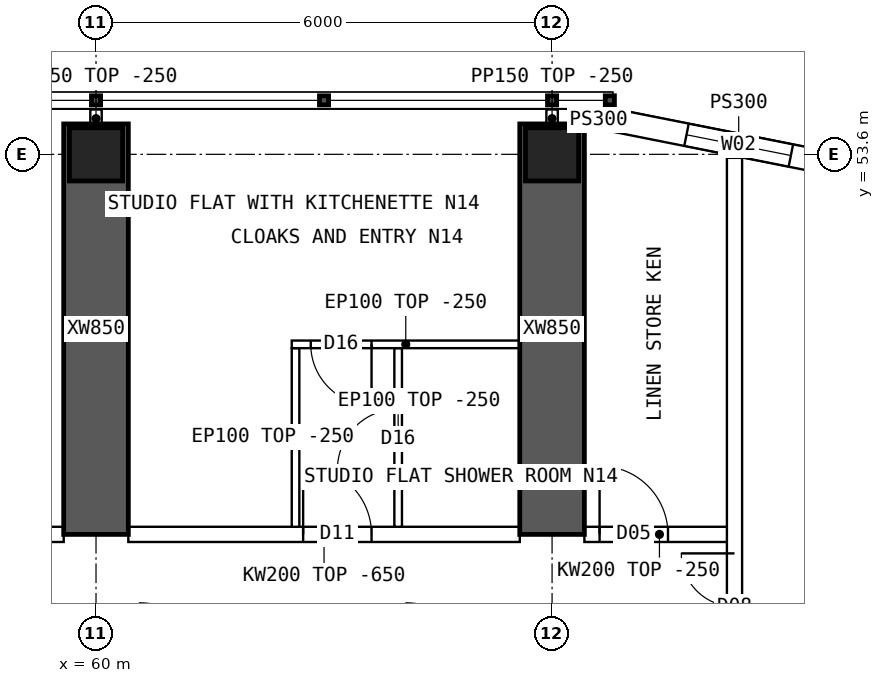
"""IFC4 building model, lengths in metres.
Left out: names, types, materials, properties, quantities, classifications, styles, units other than length and angle.
Written with IfcOpenShell. Run it as: python <this file> out.ifc"""

import sys

from ifc_helpers import new_model, si_unit, direction, frame, frame_2d, origin, origin_2d, place, context, subcontext, project, spatial, polyline, rectangle, hollow_rectangle, outline, extrude, element, fill, save


model = new_model("IFC4")
c1 = context("Model", 3, precision=1e-05, world=origin(), true_north=direction((0.0, 1.0)))
c2 = subcontext(c1, "Body", "Model", "MODEL_VIEW")
j1 = project(units=[si_unit("LENGTHUNIT", "METRE"), si_unit("PLANEANGLEUNIT", "RADIAN")], contexts=[c1])
p1 = place(None, origin())
s1 = spatial("IfcSite", under=j1, at=p1, CompositionType="ELEMENT")
p2 = place(p1, origin())
s2 = spatial("IfcBuilding", under=s1, at=p2, CompositionType="ELEMENT")
p3 = place(p2, frame((0.0, 0.0, 178.6)))
s3 = spatial("IfcBuildingStorey", under=s2, at=p3, CompositionType="ELEMENT", Elevation=178.6)
for number, where, z_axis, x_axis in (
    (1, (60.0, 53.6, 0.0), (0.0, 0.0, 1.0), (1.0, 0.0, 0.0)),
    (2, (66.0, 53.6, 0.0), (0.0, 0.0, 1.0), (1.0, 0.0, 0.0)),
):
    element("IfcColumn", number, at=place(p3, frame(where, z_axis=z_axis, x_axis=x_axis)), inside=s3, PredefinedType="COLUMN", context=c2, shape_type="SweptSolid", body=[
        extrude(hollow_rectangle(XDim=0.7, YDim=0.7, WallThickness=0.07, at=origin_2d()), origin(), (0.0, 0.0, 1.0), 3.75),
    ])
for number, where, z_axis, x_axis in (
    (3, (60.0, 48.6, 0.0), (0.0, 0.0, 1.0), (0.0, 1.0, 0.0)),
    (4, (66.0, 48.6, 0.0), (0.0, 0.0, 1.0), (0.0, 1.0, 0.0)),
):
    element("IfcWall", number, at=place(p3, frame(where, z_axis=z_axis, x_axis=x_axis)), inside=s3, PredefinedType="SHEAR", context=c2, shape_type="SweptSolid", body=[
        extrude(rectangle(XDim=5.4, YDim=0.85, at=frame_2d((2.7, 0.0))), origin(), (0.0, 0.0, 1.0), 3.75),
    ])
p4 = place(p3, frame((70.11, 53.392, 0.0), z_axis=(0.0, 0.0, 1.0), x_axis=(-0.98078325777, 0.195100490205, 0.0)))
e5 = element("IfcWall", 5, at=p4, inside=s3, PredefinedType="SOLIDWALL", context=c2, shape_type="SweptSolid", body=[
    extrude(outline(polyline([(-0.03, -0.15), (3.405, -0.15), (3.345, 0.15), (0.03, 0.15), (-0.03, -0.15)])), origin(), (0.0, 0.0, 1.0), 3.5),
])
p5 = place(p4, frame((0.988, 0.0, 0.9)))
e6 = element("IfcOpeningElement", 6, at=p5, cuts=e5, PredefinedType="OPENING", context=c2, shape_type="SweptSolid", body=[
    extrude(rectangle(XDim=1.4, YDim=1.8, at=frame_2d((0.7, 0.9))), frame((0.0, 0.16, 0.0), z_axis=(0.0, -1.0, 0.0), x_axis=(1.0, 0.0, 0.0)), (0.0, 0.0, 1.0), 0.32),
])
p6 = place(p3, frame((66.8, 54.05, 0.0), z_axis=(0.0, 0.0, 1.0), x_axis=(-1.0, 0.0, 0.0)))
e7 = element("IfcWall", 7, at=p6, inside=s3, PredefinedType="SOLIDWALL", context=c2, shape_type="SweptSolid", body=[
    extrude(rectangle(XDim=0.375, YDim=0.3, at=frame_2d((0.188, 0.0))), origin(), (0.0, 0.0, 1.0), 3.5),
])
p7 = place(p3, frame((54.425, 48.6, 0.0), z_axis=(0.0, 0.0, 1.0), x_axis=(1.0, 0.0, 0.0)))
e8 = element("IfcWall", 8, at=p7, inside=s3, PredefinedType="SOLIDWALL", context=c2, shape_type="SweptSolid", body=[
    extrude(outline(polyline([(0.0, 0.0), (5.15, 0.0), (5.15, 3.1), (0.0, 3.1), (0.0, 0.0)])), frame((0.0, 0.1, 0.0), z_axis=(0.0, -1.0, 0.0), x_axis=(1.0, 0.0, 0.0)), (0.0, 0.0, 1.0), 0.2),
])
p8 = place(p7, frame((2.6, 0.0, 0.0)))
e9 = element("IfcOpeningElement", 9, at=p8, cuts=e8, PredefinedType="OPENING", context=c2, shape_type="SweptSolid", body=[
    extrude(rectangle(XDim=0.9, YDim=2.1, at=frame_2d((0.45, 1.05))), frame((0.0, 0.11, 0.0), z_axis=(0.0, -1.0, 0.0), x_axis=(1.0, 0.0, 0.0)), (0.0, 0.0, 1.0), 0.22),
])
p9 = place(p3, frame((60.425, 48.6, 0.0), z_axis=(0.0, 0.0, 1.0), x_axis=(1.0, 0.0, 0.0)))
e10 = element("IfcWall", 10, at=p9, inside=s3, PredefinedType="SOLIDWALL", context=c2, shape_type="SweptSolid", body=[
    extrude(outline(polyline([(0.0, 0.0), (5.15, 0.0), (5.15, 3.1), (0.0, 3.1), (0.0, 0.0)])), frame((0.0, 0.1, 0.0), z_axis=(0.0, -1.0, 0.0), x_axis=(1.0, 0.0, 0.0)), (0.0, 0.0, 1.0), 0.2),
])
p10 = place(p9, frame((2.3, 0.0, 0.0)))
e11 = element("IfcOpeningElement", 11, at=p10, cuts=e10, PredefinedType="OPENING", context=c2, shape_type="SweptSolid", body=[
    extrude(rectangle(XDim=0.9, YDim=2.1, at=frame_2d((0.45, 1.05))), frame((0.0, 0.11, 0.0), z_axis=(0.0, -1.0, 0.0), x_axis=(1.0, 0.0, 0.0)), (0.0, 0.0, 1.0), 0.22),
])
p11 = place(p3, frame((66.425, 48.6, 0.0), z_axis=(0.0, 0.0, 1.0), x_axis=(1.0, 0.0, 0.0)))
e12 = element("IfcWall", 12, at=p11, inside=s3, PredefinedType="SOLIDWALL", context=c2, shape_type="SweptSolid", body=[
    extrude(rectangle(XDim=1.975, YDim=0.2, at=frame_2d((0.987, 0.0))), origin(), (0.0, 0.0, 1.0), 3.5),
])
p12 = place(p11, frame((0.2, 0.0, 0.0)))
e13 = element("IfcOpeningElement", 13, at=p12, cuts=e12, PredefinedType="OPENING", context=c2, shape_type="SweptSolid", body=[
    extrude(rectangle(XDim=0.9, YDim=2.1, at=frame_2d((0.45, 1.05))), frame((0.0, 0.11, 0.0), z_axis=(0.0, -1.0, 0.0), x_axis=(1.0, 0.0, 0.0)), (0.0, 0.0, 1.0), 0.22),
])
p13 = place(p3, frame((62.575, 51.1, 0.0), z_axis=(0.0, 0.0, 1.0), x_axis=(1.0, 0.0, 0.0)))
e14 = element("IfcWall", 14, at=p13, inside=s3, PredefinedType="PARTITIONING", context=c2, shape_type="SweptSolid", body=[
    extrude(rectangle(XDim=3.0, YDim=0.1, at=frame_2d((1.5, 0.0))), origin(), (0.0, 0.0, 1.0), 3.5),
])
p14 = place(p13, frame((0.25, 0.0, 0.0)))
e15 = element("IfcOpeningElement", 15, at=p14, cuts=e14, PredefinedType="OPENING", context=c2, shape_type="SweptSolid", body=[
    extrude(rectangle(XDim=0.8, YDim=2.1, at=frame_2d((0.4, 1.05))), frame((0.0, 0.06, 0.0), z_axis=(0.0, -1.0, 0.0), x_axis=(1.0, 0.0, 0.0)), (0.0, 0.0, 1.0), 0.12),
])
p15 = place(p3, frame((62.625, 51.05, 0.0), z_axis=(0.0, 0.0, 1.0), x_axis=(0.0, -1.0, 0.0)))
e16 = element("IfcWall", 16, at=p15, inside=s3, PredefinedType="PARTITIONING", context=c2, shape_type="SweptSolid", body=[
    extrude(outline(polyline([(0.0, 0.0), (2.35, 0.0), (2.35, 3.1), (2.302, 3.1), (2.3, 3.5), (0.0, 3.5), (0.0, 0.0)])), frame((0.0, 0.05, 0.0), z_axis=(0.0, -1.0, 0.0), x_axis=(1.0, 0.0, 0.0)), (0.0, 0.0, 1.0), 0.1),
])
p16 = place(p3, frame((63.975, 51.05, 0.0), z_axis=(0.0, 0.0, 1.0), x_axis=(0.0, -1.0, 0.0)))
e17 = element("IfcWall", 17, at=p16, inside=s3, PredefinedType="PARTITIONING", context=c2, shape_type="SweptSolid", body=[
    extrude(outline(polyline([(0.0, 0.0), (2.35, 0.0), (2.35, 3.1), (2.302, 3.1), (2.3, 3.5), (0.0, 3.5), (0.0, 0.0)])), frame((0.0, 0.05, 0.0), z_axis=(0.0, -1.0, 0.0), x_axis=(1.0, 0.0, 0.0)), (0.0, 0.0, 1.0), 0.1),
])
p17 = place(p16, frame((0.8, 0.0, 0.0)))
e18 = element("IfcOpeningElement", 18, at=p17, cuts=e17, PredefinedType="OPENING", context=c2, shape_type="SweptSolid", body=[
    extrude(rectangle(XDim=0.8, YDim=2.1, at=frame_2d((0.4, 1.05))), frame((0.0, 0.06, 0.0), z_axis=(0.0, -1.0, 0.0), x_axis=(1.0, 0.0, 0.0)), (0.0, 0.0, 1.0), 0.12),
])
p18 = place(p3, frame((68.4, 10.446, 0.0), z_axis=(0.0, 0.0, 1.0), x_axis=(0.0, 1.0, 0.0)))
e19 = element("IfcWall", 19, at=p18, inside=s3, PredefinedType="SOLIDWALL", context=c2, shape_type="SweptSolid", body=[
    extrude(rectangle(XDim=43.107, YDim=0.2, at=frame_2d((21.554, 0.0))), origin(), (0.0, 0.0, 1.0), 3.5),
])
p19 = place(p18, frame((5.104, 0.0, 0.0)))
e20 = element("IfcOpeningElement", 20, at=p19, cuts=e19, PredefinedType="OPENING", context=c2, shape_type="SweptSolid", body=[
    extrude(rectangle(XDim=1.4, YDim=2.1, at=frame_2d((0.7, 1.05))), frame((0.0, 0.11, 0.0), z_axis=(0.0, -1.0, 0.0), x_axis=(1.0, 0.0, 0.0)), (0.0, 0.0, 1.0), 0.22),
])
p20 = place(p18, frame((36.504, 0.0, 0.0)))
e21 = element("IfcOpeningElement", 21, at=p20, cuts=e19, PredefinedType="OPENING", context=c2, shape_type="SweptSolid", body=[
    extrude(rectangle(XDim=1.4, YDim=2.1, at=frame_2d((0.7, 1.05))), frame((0.0, 0.11, 0.0), z_axis=(0.0, -1.0, 0.0), x_axis=(1.0, 0.0, 0.0)), (0.0, 0.0, 1.0), 0.22),
])
for number, where, z_axis, x_axis in (
    (22, (60.0, 53.95, 0.0), (0.0, 0.0, 1.0), (0.0, 1.0, 0.0)),
    (23, (66.0, 53.95, 0.0), (0.0, 0.0, 1.0), (0.0, 1.0, 0.0)),
):
    element("IfcWall", number, at=place(p3, frame(where, z_axis=z_axis, x_axis=x_axis)), inside=s3, PredefinedType="PARTITIONING", context=c2, shape_type="SweptSolid", body=[
        extrude(rectangle(XDim=0.24, YDim=0.15, at=frame_2d((0.12, 0.0))), origin(), (0.0, 0.0, 1.0), 3.5),
    ])
p21 = place(p5, origin())
e24 = element("IfcWindow", 24, at=p21, inside=s3, PartitioningType="SINGLE_PANEL", PredefinedType="WINDOW", context=c2, shape_type="SweptSolid", body=[
    extrude(rectangle(XDim=1.4, YDim=1.8, at=frame_2d((0.7, 0.9))), frame((0.0, 0.03, 0.0), z_axis=(0.0, -1.0, 0.0), x_axis=(1.0, 0.0, 0.0)), (0.0, 0.0, 1.0), 0.06),
])
fill(e6, e24)
p22 = place(p14, origin())
e25 = element("IfcDoor", 25, at=p22, inside=s3, OperationType="SINGLE_SWING_RIGHT", PredefinedType="DOOR", context=c2, shape_type="SweptSolid", body=[
    extrude(rectangle(XDim=0.8, YDim=2.1, at=frame_2d((0.4, 1.05))), frame((0.0, 0.025, 0.0), z_axis=(0.0, -1.0, 0.0), x_axis=(1.0, 0.0, 0.0)), (0.0, 0.0, 1.0), 0.05),
])
fill(e15, e25)
p23 = place(p17, origin())
e26 = element("IfcDoor", 26, at=p23, inside=s3, OperationType="SINGLE_SWING_RIGHT", PredefinedType="DOOR", context=c2, shape_type="SweptSolid", body=[
    extrude(rectangle(XDim=0.8, YDim=2.1, at=frame_2d((0.4, 1.05))), frame((0.0, 0.025, 0.0), z_axis=(0.0, -1.0, 0.0), x_axis=(1.0, 0.0, 0.0)), (0.0, 0.0, 1.0), 0.05),
])
fill(e18, e26)
p24 = place(p10, origin())
e27 = element("IfcDoor", 27, at=p24, inside=s3, OperationType="SINGLE_SWING_LEFT", PredefinedType="DOOR", context=c2, shape_type="SweptSolid", body=[
    extrude(rectangle(XDim=0.9, YDim=2.1, at=frame_2d((0.45, 1.05))), frame((0.0, 0.025, 0.0), z_axis=(0.0, -1.0, 0.0), x_axis=(1.0, 0.0, 0.0)), (0.0, 0.0, 1.0), 0.05),
])
fill(e11, e27)
p25 = place(p20, origin())
e28 = element("IfcDoor", 28, at=p25, inside=s3, OperationType="DOUBLE_DOOR_SINGLE_SWING", PredefinedType="DOOR", context=c2, shape_type="SweptSolid", body=[
    extrude(rectangle(XDim=1.4, YDim=2.1, at=frame_2d((0.7, 1.05))), frame((0.0, 0.025, 0.0), z_axis=(0.0, -1.0, 0.0), x_axis=(1.0, 0.0, 0.0)), (0.0, 0.0, 1.0), 0.05),
])
fill(e21, e28)
p26 = place(p12, origin())
e29 = element("IfcDoor", 29, at=p26, inside=s3, OperationType="SINGLE_SWING_LEFT", PredefinedType="DOOR", context=c2, shape_type="SweptSolid", body=[
    extrude(rectangle(XDim=0.9, YDim=2.1, at=frame_2d((0.45, 1.05))), frame((0.0, 0.025, 0.0), z_axis=(0.0, -1.0, 0.0), x_axis=(1.0, 0.0, 0.0)), (0.0, 0.0, 1.0), 0.05),
])
fill(e13, e29)
save(model, sys.argv[1])
